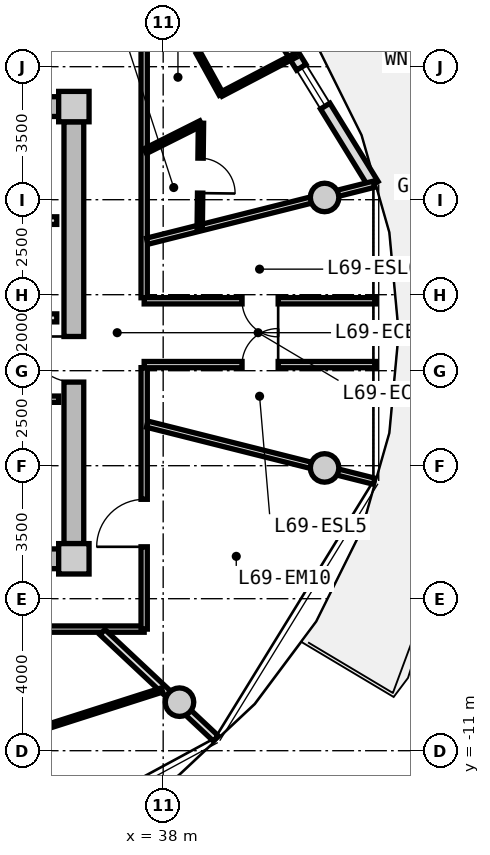
"""IFC4 building model, lengths in metres.
Left out: names, types, materials, properties, quantities, classifications, styles, units other than length and angle.
Written with IfcOpenShell. Run it as: python <this file> out.ifc"""

import sys

from ifc_helpers import new_model, si_unit, direction, frame, frame_2d, origin, origin_2d, place, context, subcontext, project, spatial, rectangle, circle, extrude, source, transform, mapped, element, fill, save


model = new_model("IFC4")
c1 = context("Model", 3, precision=1e-05, world=origin(), true_north=direction((0.0, 1.0)))
c2 = subcontext(c1, "Body", "Model", "MODEL_VIEW")
j1 = project(units=[si_unit("LENGTHUNIT", "METRE"), si_unit("PLANEANGLEUNIT", "RADIAN")], contexts=[c1])
p1 = place(None, origin())
s1 = spatial("IfcSite", under=j1, at=p1, CompositionType="ELEMENT")
p2 = place(p1, origin())
s2 = spatial("IfcBuilding", under=s1, at=p2, CompositionType="ELEMENT")
p3 = place(p2, frame((0.0, 0.0, 223.05)))
s3 = spatial("IfcBuildingStorey", under=s2, at=p3, CompositionType="ELEMENT", Elevation=223.05)
m1 = source(origin(), c2, "Body", "SweptSolid", [
    extrude(rectangle(XDim=0.8, YDim=0.8, at=origin_2d()), origin(), (0.0, 0.0, 1.0), 3.05),
])
for number, where, z_axis, x_axis in (
    (1, (35.65, -5.95, 0.0), (0.0, 0.0, 1.0), (1.0, 0.0, 0.0)),
    (2, (35.65, 5.95, 0.0), (0.0, 0.0, 1.0), (1.0, 0.0, 0.0)),
):
    element("IfcColumn", number, at=place(p3, frame(where, z_axis=z_axis, x_axis=x_axis)), inside=s3, PredefinedType="COLUMN", context=c2, shape_type="MappedRepresentation", body=[
        mapped(m1, transform((0.0, 0.0, 0.0), x_axis=(1.0, 0.0, 0.0), y_axis=(0.0, 1.0, 0.0), z_axis=(0.0, 0.0, 1.0), scale=1.0)),
    ])
m2 = source(origin(), c2, "Body", "SweptSolid", [
    extrude(rectangle(XDim=14.5, YDim=0.52, at=frame_2d((7.25, 0.0))), origin(), (0.0, 0.0, 1.0), 2.76),
])
for number, where, z_axis, x_axis in (
    (3, (20.75, 5.95, 0.0), (0.0, 0.0, 1.0), (1.0, 0.0, 0.0)),
    (4, (35.25, -5.95, 0.0), (0.0, 0.0, 1.0), (-1.0, 0.0, 0.0)),
):
    element("IfcWall", number, at=place(p3, frame(where, z_axis=z_axis, x_axis=x_axis)), inside=s3, PredefinedType="SHEAR", context=c2, shape_type="MappedRepresentation", body=[
        mapped(m2, transform((0.0, 0.0, 0.0), x_axis=(1.0, 0.0, 0.0), y_axis=(0.0, 1.0, 0.0), z_axis=(0.0, 0.0, 1.0), scale=1.0)),
    ])
m3 = source(origin(), c2, "Body", "SweptSolid", [
    extrude(rectangle(XDim=11.1, YDim=0.52, at=frame_2d((5.55, 0.0))), origin(), (0.0, 0.0, 1.0), 2.76),
])
p4 = place(p3, frame((35.65, 5.55, 0.0), z_axis=(0.0, 0.0, 1.0), x_axis=(0.0, -1.0, 0.0)))
e5 = element("IfcWall", 5, at=p4, inside=s3, PredefinedType="SHEAR", context=c2, shape_type="MappedRepresentation", body=[
    mapped(m3, transform((0.0, 0.0, 0.0), x_axis=(1.0, 0.0, 0.0), y_axis=(0.0, 1.0, 0.0), z_axis=(0.0, 0.0, 1.0), scale=1.0)),
])
p5 = place(p4, frame((5.65, 0.0, 0.0)))
e6 = element("IfcOpeningElement", 6, at=p5, cuts=e5, PredefinedType="OPENING", context=c2, shape_type="SweptSolid", body=[
    extrude(rectangle(XDim=1.2, YDim=2.15, at=frame_2d((0.6, 1.075))), frame((0.0, 0.27, 0.0), z_axis=(0.0, -1.0, 0.0), x_axis=(1.0, 0.0, 0.0)), (0.0, 0.0, 1.0), 0.54),
])
m4 = source(origin(), c2, "Body", "SweptSolid", [
    extrude(circle(Radius=0.375, at=origin_2d()), origin(), (0.0, 0.0, 1.0), 3.05),
])
for number, where, z_axis, x_axis in (
    (7, (42.247, 3.559, 0.0), (0.0, 0.0, 1.0), (1.0, 0.0, 0.0)),
    (8, (38.43, -9.723, 0.0), (0.0, 0.0, 1.0), (1.0, 0.0, 0.0)),
    (9, (42.247, -3.559, 0.0), (0.0, 0.0, 1.0), (1.0, 0.0, 0.0)),
):
    element("IfcColumn", number, at=place(p3, frame(where, z_axis=z_axis, x_axis=x_axis)), inside=s3, PredefinedType="COLUMN", context=c2, shape_type="MappedRepresentation", body=[
        mapped(m4, transform((0.0, 0.0, 0.0), x_axis=(1.0, 0.0, 0.0), y_axis=(0.0, 1.0, 0.0), z_axis=(0.0, 0.0, 1.0), scale=1.0)),
    ])
m5 = source(origin(), c2, "Body", "SweptSolid", [
    extrude(rectangle(XDim=7.938, YDim=0.29, at=frame_2d((3.969, 0.0))), origin(), (0.0, 0.0, 1.0), 2.76),
])
p6 = place(p3, frame((39.37, 10.663, 0.0), z_axis=(0.0, 0.0, 1.0), x_axis=(0.524244987663, -0.851567491694, 0.0)))
e10 = element("IfcWall", 10, at=p6, inside=s3, PredefinedType="SOLIDWALL", context=c2, shape_type="MappedRepresentation", body=[
    mapped(m5, transform((0.0, 0.0, 0.0), x_axis=(1.0, 0.0, 0.0), y_axis=(0.0, 1.0, 0.0), z_axis=(0.0, 0.0, 1.0), scale=1.0)),
])
p7 = place(p6, frame((0.9, 0.0, 0.0)))
e11 = element("IfcOpeningElement", 11, at=p7, cuts=e10, PredefinedType="OPENING", context=c2, shape_type="SweptSolid", body=[
    extrude(rectangle(XDim=1.15, YDim=2.25, at=frame_2d((0.575, 1.125))), frame((0.0, 0.155, 0.0), z_axis=(0.0, -1.0, 0.0), x_axis=(1.0, 0.0, 0.0)), (0.0, 0.0, 1.0), 0.31),
])
p8 = place(p6, frame((4.319, 0.0, 0.85)))
e12 = element("IfcOpeningElement", 12, at=p8, cuts=e10, PredefinedType="OPENING", context=c2, shape_type="SweptSolid", body=[
    extrude(rectangle(XDim=1.2, YDim=1.5, at=frame_2d((0.6, 0.75))), frame((0.0, 0.155, 0.0), z_axis=(0.0, -1.0, 0.0), x_axis=(1.0, 0.0, 0.0)), (0.0, 0.0, 1.0), 0.31),
])
m6 = source(origin(), c2, "Body", "SweptSolid", [
    extrude(rectangle(XDim=3.2, YDim=0.2, at=frame_2d((1.6, 0.0))), origin(), (0.0, 0.0, 1.0), 2.745),
])
p9 = place(p3, frame((32.0, 2.95, 0.0), z_axis=(0.0, 0.0, 1.0), x_axis=(1.0, 0.0, 0.0)))
e13 = element("IfcWall", 13, at=p9, inside=s3, PredefinedType="PARTITIONING", context=c2, shape_type="MappedRepresentation", body=[
    mapped(m6, transform((0.0, 0.0, 0.0), x_axis=(1.0, 0.0, 0.0), y_axis=(0.0, 1.0, 0.0), z_axis=(0.0, 0.0, 1.0), scale=1.0)),
])
m7 = source(origin(), c2, "Body", "SweptSolid", [
    extrude(rectangle(XDim=6.66, YDim=0.21, at=frame_2d((3.33, 0.0))), origin(), (0.0, 0.0, 1.0), 2.745),
])
p10 = place(p3, frame((28.54, 0.39, 0.0), z_axis=(0.0, 0.0, 1.0), x_axis=(1.0, 0.0, 0.0)))
e14 = element("IfcWall", 14, at=p10, inside=s3, PredefinedType="PARTITIONING", context=c2, shape_type="MappedRepresentation", body=[
    mapped(m7, transform((0.0, 0.0, 0.0), x_axis=(1.0, 0.0, 0.0), y_axis=(0.0, 1.0, 0.0), z_axis=(0.0, 0.0, 1.0), scale=1.0)),
])
p11 = place(p10, frame((1.0, 0.0, 0.0)))
e15 = element("IfcOpeningElement", 15, at=p11, cuts=e14, PredefinedType="OPENING", context=c2, shape_type="SweptSolid", body=[
    extrude(rectangle(XDim=1.2, YDim=2.15, at=frame_2d((0.6, 1.075))), frame((0.0, 0.115, 0.0), z_axis=(0.0, -1.0, 0.0), x_axis=(1.0, 0.0, 0.0)), (0.0, 0.0, 1.0), 0.23),
])
m8 = source(origin(), c2, "Body", "SweptSolid", [
    extrude(rectangle(XDim=2.7, YDim=0.165, at=frame_2d((1.35, 0.0))), origin(), (0.0, 0.0, 1.0), 2.745),
])
p12 = place(p3, frame((32.55, -1.75, 0.0), z_axis=(0.0, 0.0, 1.0), x_axis=(1.0, 0.0, 0.0)))
e16 = element("IfcWall", 16, at=p12, inside=s3, PredefinedType="PARTITIONING", context=c2, shape_type="MappedRepresentation", body=[
    mapped(m8, transform((0.0, 0.0, 0.0), x_axis=(1.0, 0.0, 0.0), y_axis=(0.0, 1.0, 0.0), z_axis=(0.0, 0.0, 1.0), scale=1.0)),
])
p13 = place(p12, frame((0.222, 0.0, 0.0)))
e17 = element("IfcOpeningElement", 17, at=p13, cuts=e16, PredefinedType="OPENING", context=c2, shape_type="SweptSolid", body=[
    extrude(rectangle(XDim=0.925, YDim=2.1, at=frame_2d((0.462, 1.05))), frame((0.0, 0.093, 0.0), z_axis=(0.0, -1.0, 0.0), x_axis=(1.0, 0.0, 0.0)), (0.0, 0.0, 1.0), 0.185),
])
p14 = place(p12, frame((1.522, 0.0, 0.0)))
e18 = element("IfcOpeningElement", 18, at=p14, cuts=e16, PredefinedType="OPENING", context=c2, shape_type="SweptSolid", body=[
    extrude(rectangle(XDim=0.925, YDim=2.1, at=frame_2d((0.462, 1.05))), frame((0.0, 0.093, 0.0), z_axis=(0.0, -1.0, 0.0), x_axis=(1.0, 0.0, 0.0)), (0.0, 0.0, 1.0), 0.185),
])
m9 = source(origin(), c2, "Body", "SweptSolid", [
    extrude(rectangle(XDim=19.0, YDim=0.165, at=frame_2d((9.5, 0.0))), origin(), (0.0, 0.0, 1.0), 2.745),
])
p15 = place(p3, frame((37.5, -7.8, 0.0), z_axis=(0.0, 0.0, 1.0), x_axis=(-1.0, 0.0, 0.0)))
e19 = element("IfcWall", 19, at=p15, inside=s3, PredefinedType="PARTITIONING", context=c2, shape_type="MappedRepresentation", body=[
    mapped(m9, transform((0.0, 0.0, 0.0), x_axis=(1.0, 0.0, 0.0), y_axis=(0.0, 1.0, 0.0), z_axis=(0.0, 0.0, 1.0), scale=1.0)),
])
p16 = place(p15, frame((9.392, 0.0, 0.0)))
e20 = element("IfcOpeningElement", 20, at=p16, cuts=e19, PredefinedType="OPENING", context=c2, shape_type="SweptSolid", body=[
    extrude(rectangle(XDim=1.05, YDim=2.15, at=frame_2d((0.525, 1.075))), frame((0.0, 0.093, 0.0), z_axis=(0.0, -1.0, 0.0), x_axis=(1.0, 0.0, 0.0)), (0.0, 0.0, 1.0), 0.185),
])
m10 = source(origin(), c2, "Body", "SweptSolid", [
    extrude(rectangle(XDim=6.88, YDim=0.165, at=frame_2d((3.44, 0.0))), origin(), (0.0, 0.0, 1.0), 2.745),
])
p17 = place(p3, frame((37.5, 7.8, 0.0), z_axis=(0.0, 0.0, 1.0), x_axis=(0.0, -1.0, 0.0)))
e21 = element("IfcWall", 21, at=p17, inside=s3, PredefinedType="PARTITIONING", context=c2, shape_type="MappedRepresentation", body=[
    mapped(m10, transform((0.0, 0.0, 0.0), x_axis=(1.0, 0.0, 0.0), y_axis=(0.0, 1.0, 0.0), z_axis=(0.0, 0.0, 1.0), scale=1.0)),
])
p18 = place(p3, frame((37.5, -0.92, 0.0), z_axis=(0.0, 0.0, 1.0), x_axis=(0.0, -1.0, 0.0)))
e22 = element("IfcWall", 22, at=p18, inside=s3, PredefinedType="PARTITIONING", context=c2, shape_type="MappedRepresentation", body=[
    mapped(m10, transform((0.0, 0.0, 0.0), x_axis=(1.0, 0.0, 0.0), y_axis=(0.0, 1.0, 0.0), z_axis=(0.0, 0.0, 1.0), scale=1.0)),
])
p19 = place(p18, frame((3.464, 0.0, 0.0)))
e23 = element("IfcOpeningElement", 23, at=p19, cuts=e22, PredefinedType="OPENING", context=c2, shape_type="SweptSolid", body=[
    extrude(rectangle(XDim=1.25, YDim=2.2, at=frame_2d((0.625, 1.1))), frame((0.0, 0.093, 0.0), z_axis=(0.0, -1.0, 0.0), x_axis=(1.0, 0.0, 0.0)), (0.0, 0.0, 1.0), 0.185),
])
m11 = source(origin(), c2, "Body", "SweptSolid", [
    extrude(rectangle(XDim=6.157, YDim=0.165, at=frame_2d((3.079, 0.0))), origin(), (0.0, 0.0, 1.0), 2.345),
])
for number, where, z_axis, x_axis in (
    (24, (37.58, -2.407, 0.0), (0.0, 0.0, 1.0), (0.97, -0.244, 0.0)),
    (25, (37.58, 2.407, 0.0), (0.0, 0.0, 1.0), (0.97, 0.244, 0.0)),
):
    element("IfcWall", number, at=place(p3, frame(where, z_axis=z_axis, x_axis=x_axis)), inside=s3, PredefinedType="PARTITIONING", context=c2, shape_type="MappedRepresentation", body=[
        mapped(m11, transform((0.0, 0.0, 0.0), x_axis=(1.0, 0.0, 0.0), y_axis=(0.0, 1.0, 0.0), z_axis=(0.0, 0.0, 1.0), scale=1.0)),
    ])
m12 = source(origin(), c2, "Body", "SweptSolid", [
    extrude(rectangle(XDim=6.101, YDim=0.165, at=frame_2d((3.051, 0.0))), origin(), (0.0, 0.0, 1.0), 2.745),
])
p20 = place(p3, frame((37.5, 0.84, 0.0), z_axis=(0.0, 0.0, 1.0), x_axis=(1.0, 0.0, 0.0)))
e26 = element("IfcWall", 26, at=p20, inside=s3, PredefinedType="PARTITIONING", context=c2, shape_type="MappedRepresentation", body=[
    mapped(m12, transform((0.0, 0.0, 0.0), x_axis=(1.0, 0.0, 0.0), y_axis=(0.0, 1.0, 0.0), z_axis=(0.0, 0.0, 1.0), scale=1.0)),
])
p21 = place(p20, frame((2.576, 0.0, 0.0)))
e27 = element("IfcOpeningElement", 27, at=p21, cuts=e26, PredefinedType="OPENING", context=c2, shape_type="SweptSolid", body=[
    extrude(rectangle(XDim=0.95, YDim=2.1, at=frame_2d((0.475, 1.05))), frame((0.0, 0.093, 0.0), z_axis=(0.0, -1.0, 0.0), x_axis=(1.0, 0.0, 0.0)), (0.0, 0.0, 1.0), 0.185),
])
p22 = place(p3, frame((43.601, -0.84, 0.0), z_axis=(0.0, 0.0, 1.0), x_axis=(-1.0, 0.0, 0.0)))
e28 = element("IfcWall", 28, at=p22, inside=s3, PredefinedType="PARTITIONING", context=c2, shape_type="MappedRepresentation", body=[
    mapped(m12, transform((0.0, 0.0, 0.0), x_axis=(1.0, 0.0, 0.0), y_axis=(0.0, 1.0, 0.0), z_axis=(0.0, 0.0, 1.0), scale=1.0)),
])
p23 = place(p22, frame((2.576, 0.0, 0.0)))
e29 = element("IfcOpeningElement", 29, at=p23, cuts=e28, PredefinedType="OPENING", context=c2, shape_type="SweptSolid", body=[
    extrude(rectangle(XDim=0.95, YDim=2.1, at=frame_2d((0.475, 1.05))), frame((0.0, 0.093, 0.0), z_axis=(0.0, -1.0, 0.0), x_axis=(1.0, 0.0, 0.0)), (0.0, 0.0, 1.0), 0.185),
])
m13 = source(origin(), c2, "Body", "SweptSolid", [
    extrude(rectangle(XDim=1.638, YDim=0.14, at=frame_2d((0.819, 0.0))), origin(), (0.0, 0.0, 1.0), 2.745),
])
p24 = place(p3, frame((37.53, 4.778, 0.0), z_axis=(0.0, 0.0, 1.0), x_axis=(0.893919977945, 0.448226586707, 0.0)))
e30 = element("IfcWall", 30, at=p24, inside=s3, PredefinedType="PARTITIONING", context=c2, shape_type="MappedRepresentation", body=[
    mapped(m13, transform((0.0, 0.0, 0.0), x_axis=(1.0, 0.0, 0.0), y_axis=(0.0, 1.0, 0.0), z_axis=(0.0, 0.0, 1.0), scale=1.0)),
])
m14 = source(origin(), c2, "Body", "SweptSolid", [
    extrude(rectangle(XDim=2.759, YDim=0.14, at=frame_2d((1.379, 0.0))), origin(), (0.0, 0.0, 1.0), 2.745),
])
p25 = place(p3, frame((38.995, 5.513, 0.0), z_axis=(0.0, 0.0, 1.0), x_axis=(-0.01194710728, -0.999928630767, 0.0)))
e31 = element("IfcWall", 31, at=p25, inside=s3, PredefinedType="PARTITIONING", context=c2, shape_type="MappedRepresentation", body=[
    mapped(m14, transform((0.0, 0.0, 0.0), x_axis=(1.0, 0.0, 0.0), y_axis=(0.0, 1.0, 0.0), z_axis=(0.0, 0.0, 1.0), scale=1.0)),
])
p26 = place(p25, frame((0.919, 0.0, 0.0)))
e32 = element("IfcOpeningElement", 32, at=p26, cuts=e31, PredefinedType="OPENING", context=c2, shape_type="SweptSolid", body=[
    extrude(rectangle(XDim=0.92, YDim=2.1, at=frame_2d((0.46, 1.05))), frame((0.0, 0.08, 0.0), z_axis=(0.0, -1.0, 0.0), x_axis=(1.0, 0.0, 0.0)), (0.0, 0.0, 1.0), 0.16),
])
m15 = source(origin(), c2, "Body", "SweptSolid", [
    extrude(rectangle(XDim=2.193, YDim=0.115, at=frame_2d((1.097, 0.0))), origin(), (0.0, 0.0, 1.0), 2.745),
])
p27 = place(p3, frame((39.525, 6.275, 0.0), z_axis=(0.0, 0.0, 1.0), x_axis=(0.885783595046, 0.464098505435, 0.0)))
e33 = element("IfcWall", 33, at=p27, inside=s3, PredefinedType="PARTITIONING", context=c2, shape_type="MappedRepresentation", body=[
    mapped(m15, transform((0.0, 0.0, 0.0), x_axis=(1.0, 0.0, 0.0), y_axis=(0.0, 1.0, 0.0), z_axis=(0.0, 0.0, 1.0), scale=1.0)),
])
m16 = source(origin(), c2, "Body", "SweptSolid", [
    extrude(rectangle(XDim=3.45, YDim=0.115, at=frame_2d((1.725, 0.0))), origin(), (0.0, 0.0, 1.0), 2.745),
])
p28 = place(p3, frame((39.525, 6.275, 0.0), z_axis=(0.0, 0.0, 1.0), x_axis=(-0.483659007882, 0.875256513312, 0.0)))
e34 = element("IfcWall", 34, at=p28, inside=s3, PredefinedType="PARTITIONING", context=c2, shape_type="MappedRepresentation", body=[
    mapped(m16, transform((0.0, 0.0, 0.0), x_axis=(1.0, 0.0, 0.0), y_axis=(0.0, 1.0, 0.0), z_axis=(0.0, 0.0, 1.0), scale=1.0)),
])
p29 = place(p28, frame((1.25, 0.0, 0.0)))
e35 = element("IfcOpeningElement", 35, at=p29, cuts=e34, PredefinedType="OPENING", context=c2, shape_type="SweptSolid", body=[
    extrude(rectangle(XDim=0.95, YDim=2.1, at=frame_2d((0.475, 1.05))), frame((0.0, 0.067, 0.0), z_axis=(0.0, -1.0, 0.0), x_axis=(1.0, 0.0, 0.0)), (0.0, 0.0, 1.0), 0.135),
])
m17 = source(origin(), c2, "Body", "SweptSolid", [
    extrude(rectangle(XDim=4.089, YDim=0.19, at=frame_2d((2.044, 0.0))), origin(), (0.0, 0.0, 1.0), 2.345),
])
p30 = place(p3, frame((36.402, -7.88, 0.0), z_axis=(0.0, 0.0, 1.0), x_axis=(0.729401273609, -0.684086092577, 0.0)))
e36 = element("IfcWall", 36, at=p30, inside=s3, PredefinedType="PARTITIONING", context=c2, shape_type="MappedRepresentation", body=[
    mapped(m17, transform((0.0, 0.0, 0.0), x_axis=(1.0, 0.0, 0.0), y_axis=(0.0, 1.0, 0.0), z_axis=(0.0, 0.0, 1.0), scale=1.0)),
])
m18 = source(origin(), c2, "Body", "SweptSolid", [
    extrude(rectangle(XDim=7.024, YDim=0.115, at=frame_2d((3.512, 0.0))), origin(), (0.0, 0.0, 1.0), 2.745),
])
p31 = place(p3, frame((31.28, -11.542, 0.0), z_axis=(0.0, 0.0, 1.0), x_axis=(0.952454006655, 0.304682400552, 0.0)))
e37 = element("IfcWall", 37, at=p31, inside=s3, PredefinedType="PARTITIONING", context=c2, shape_type="MappedRepresentation", body=[
    mapped(m18, transform((0.0, 0.0, 0.0), x_axis=(1.0, 0.0, 0.0), y_axis=(0.0, 1.0, 0.0), z_axis=(0.0, 0.0, 1.0), scale=1.0)),
])
p32 = place(p31, frame((3.037, 0.0, 0.0)))
e38 = element("IfcOpeningElement", 38, at=p32, cuts=e37, PredefinedType="OPENING", context=c2, shape_type="SweptSolid", body=[
    extrude(rectangle(XDim=0.95, YDim=2.1, at=frame_2d((0.475, 1.05))), frame((0.0, 0.067, 0.0), z_axis=(0.0, -1.0, 0.0), x_axis=(1.0, 0.0, 0.0)), (0.0, 0.0, 1.0), 0.135),
])
m19 = source(origin(), c2, "Body", "SweptSolid", [
    extrude(rectangle(XDim=1.2, YDim=1.5, at=frame_2d((0.6, 0.75))), frame((0.0, 0.03, 0.0), z_axis=(0.0, -1.0, 0.0), x_axis=(1.0, 0.0, 0.0)), (0.0, 0.0, 1.0), 0.06),
])
p33 = place(p8, origin())
e39 = element("IfcWindow", 39, at=p33, inside=s3, PartitioningType="SINGLE_PANEL", PredefinedType="WINDOW", context=c2, shape_type="MappedRepresentation", body=[
    mapped(m19, transform((0.0, 0.0, 0.0), x_axis=(1.0, 0.0, 0.0), y_axis=(0.0, 1.0, 0.0), z_axis=(0.0, 0.0, 1.0), scale=1.0)),
])
fill(e12, e39)
m20 = source(origin(), c2, "Body", "SweptSolid", [
    extrude(rectangle(XDim=1.2, YDim=2.15, at=frame_2d((0.6, 1.075))), frame((0.0, 0.025, 0.0), z_axis=(0.0, -1.0, 0.0), x_axis=(1.0, 0.0, 0.0)), (0.0, 0.0, 1.0), 0.05),
])
p34 = place(p5, frame((1.2, 0.0, 0.0), z_axis=(0.0, 0.0, 1.0), x_axis=(-1.0, 0.0, 0.0)))
e40 = element("IfcDoor", 40, at=p34, inside=s3, OperationType="SINGLE_SWING_RIGHT", PredefinedType="DOOR", context=c2, shape_type="MappedRepresentation", body=[
    mapped(m20, transform((0.0, 0.0, 0.0), x_axis=(1.0, 0.0, 0.0), y_axis=(0.0, 1.0, 0.0), z_axis=(0.0, 0.0, 1.0), scale=1.0)),
])
fill(e6, e40)
m21 = source(origin(), c2, "Body", "SweptSolid", [
    extrude(rectangle(XDim=0.95, YDim=2.1, at=frame_2d((0.475, 1.05))), frame((0.0, 0.025, 0.0), z_axis=(0.0, -1.0, 0.0), x_axis=(1.0, 0.0, 0.0)), (0.0, 0.0, 1.0), 0.05),
])
p35 = place(p23, frame((0.95, 0.0, 0.0), z_axis=(0.0, 0.0, 1.0), x_axis=(-1.0, 0.0, 0.0)))
e41 = element("IfcDoor", 41, at=p35, inside=s3, OperationType="SINGLE_SWING_RIGHT", PredefinedType="DOOR", context=c2, shape_type="MappedRepresentation", body=[
    mapped(m21, transform((0.0, 0.0, 0.0), x_axis=(1.0, 0.0, 0.0), y_axis=(0.0, 1.0, 0.0), z_axis=(0.0, 0.0, 1.0), scale=1.0)),
])
fill(e29, e41)
p36 = place(p21, frame((0.95, 0.0, 0.0), z_axis=(0.0, 0.0, 1.0), x_axis=(-1.0, 0.0, 0.0)))
e42 = element("IfcDoor", 42, at=p36, inside=s3, OperationType="SINGLE_SWING_LEFT", PredefinedType="DOOR", context=c2, shape_type="MappedRepresentation", body=[
    mapped(m21, transform((0.0, 0.0, 0.0), x_axis=(1.0, 0.0, 0.0), y_axis=(0.0, 1.0, 0.0), z_axis=(0.0, 0.0, 1.0), scale=1.0)),
])
fill(e27, e42)
m22 = source(origin(), c2, "Body", "SweptSolid", [
    extrude(rectangle(XDim=0.92, YDim=2.1, at=frame_2d((0.46, 1.05))), frame((0.0, 0.025, 0.0), z_axis=(0.0, -1.0, 0.0), x_axis=(1.0, 0.0, 0.0)), (0.0, 0.0, 1.0), 0.05),
])
p37 = place(p26, origin())
e43 = element("IfcDoor", 43, at=p37, inside=s3, OperationType="SINGLE_SWING_RIGHT", PredefinedType="DOOR", context=c2, shape_type="MappedRepresentation", body=[
    mapped(m22, transform((0.0, 0.0, 0.0), x_axis=(1.0, 0.0, 0.0), y_axis=(0.0, 1.0, 0.0), z_axis=(0.0, 0.0, 1.0), scale=1.0)),
])
fill(e32, e43)
p38 = place(p29, frame((0.95, 0.0, 0.0), z_axis=(0.0, 0.0, 1.0), x_axis=(-1.0, 0.0, 0.0)))
e44 = element("IfcDoor", 44, at=p38, inside=s3, OperationType="SINGLE_SWING_LEFT", PredefinedType="DOOR", context=c2, shape_type="MappedRepresentation", body=[
    mapped(m21, transform((0.0, 0.0, 0.0), x_axis=(1.0, 0.0, 0.0), y_axis=(0.0, 1.0, 0.0), z_axis=(0.0, 0.0, 1.0), scale=1.0)),
])
fill(e35, e44)
p39 = place(p32, origin())
e45 = element("IfcDoor", 45, at=p39, inside=s3, OperationType="SINGLE_SWING_RIGHT", PredefinedType="DOOR", context=c2, shape_type="MappedRepresentation", body=[
    mapped(m21, transform((0.0, 0.0, 0.0), x_axis=(1.0, 0.0, 0.0), y_axis=(0.0, 1.0, 0.0), z_axis=(0.0, 0.0, 1.0), scale=1.0)),
])
fill(e38, e45)
m23 = source(origin(), c2, "Body", "SweptSolid", [
    extrude(rectangle(XDim=1.25, YDim=2.2, at=frame_2d((0.625, 1.1))), frame((0.0, 0.025, 0.0), z_axis=(0.0, -1.0, 0.0), x_axis=(1.0, 0.0, 0.0)), (0.0, 0.0, 1.0), 0.05),
])
p40 = place(p19, frame((1.25, 0.0, 0.0), z_axis=(0.0, 0.0, 1.0), x_axis=(-1.0, 0.0, 0.0)))
e46 = element("IfcDoor", 46, at=p40, inside=s3, OperationType="SINGLE_SWING_LEFT", PredefinedType="DOOR", context=c2, shape_type="MappedRepresentation", body=[
    mapped(m23, transform((0.0, 0.0, 0.0), x_axis=(1.0, 0.0, 0.0), y_axis=(0.0, 1.0, 0.0), z_axis=(0.0, 0.0, 1.0), scale=1.0)),
])
fill(e23, e46)
save(model, sys.argv[1])
